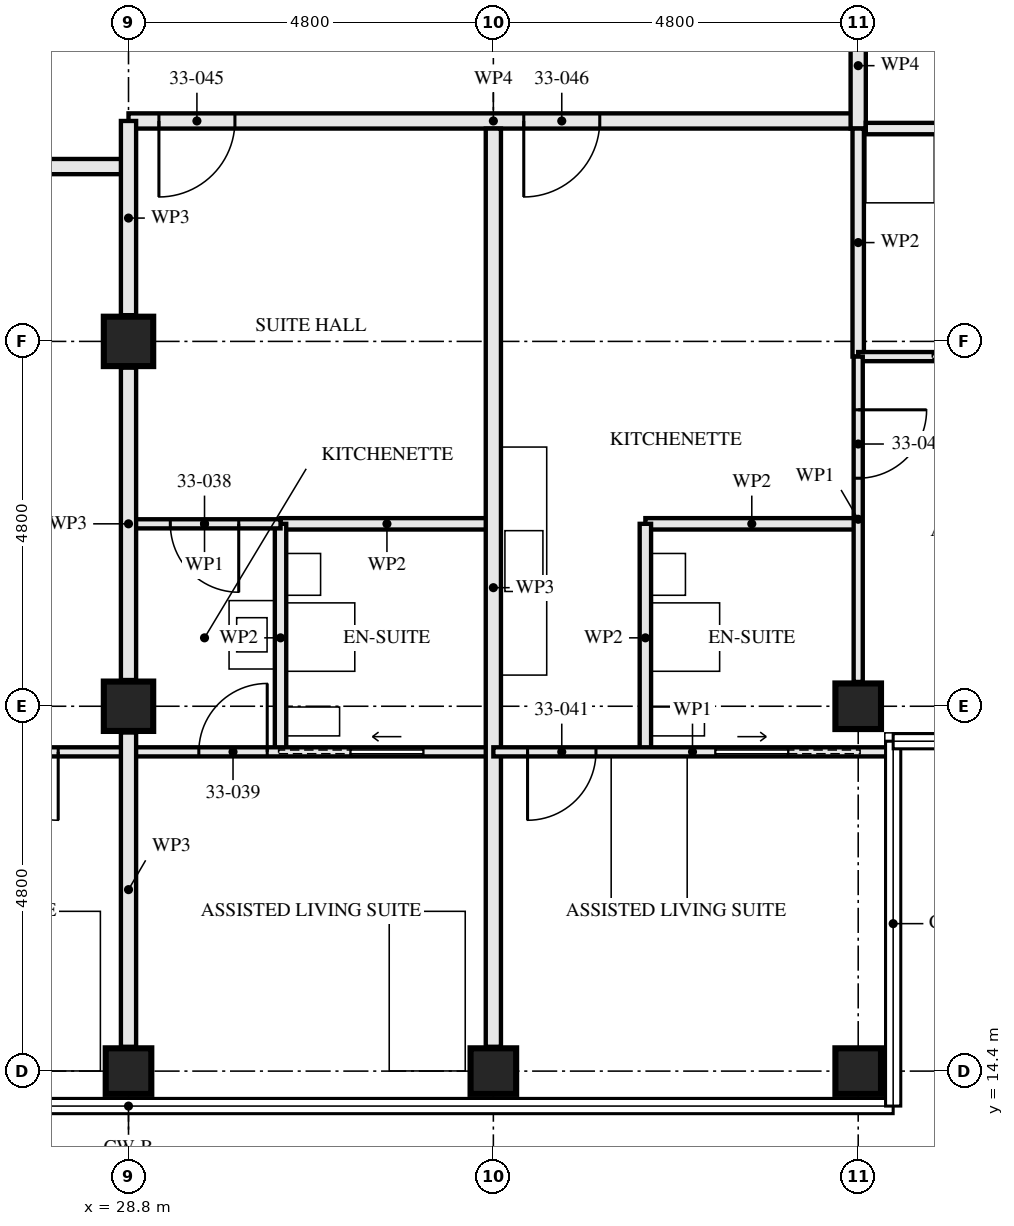
"""IFC4 building model, lengths in metres.
Left out: names, types, materials, properties, quantities, classifications, styles, units other than length and angle.
Written with IfcOpenShell. Run it as: python <this file> out.ifc"""

import sys

from ifc_helpers import new_model, si_unit, direction, frame, frame_2d, origin, origin_2d, place, context, subcontext, project, spatial, rectangle, hollow_rectangle, extrude, element, fill, save


model = new_model("IFC4")
c1 = context("Model", 3, precision=1e-05, world=origin(), true_north=direction((0.0, 1.0)))
c2 = subcontext(c1, "Body", "Model", "MODEL_VIEW")
j1 = project(units=[si_unit("LENGTHUNIT", "METRE"), si_unit("PLANEANGLEUNIT", "RADIAN")], contexts=[c1])
p1 = place(None, origin())
s1 = spatial("IfcSite", under=j1, at=p1, CompositionType="ELEMENT")
p2 = place(p1, origin())
s2 = spatial("IfcBuilding", under=s1, at=p2, CompositionType="ELEMENT")
p3 = place(p2, frame((0.0, 0.0, 122.5)))
s3 = spatial("IfcBuildingStorey", under=s2, at=p3, CompositionType="ELEMENT", Elevation=122.5)
p4 = place(p3, frame((28.8, 14.4, 0.0), z_axis=(0.0, 0.0, 1.0), x_axis=(0.0, 1.0, 0.0)))
e1 = element("IfcColumn", 1, at=p4, inside=s3, PredefinedType="COLUMN", context=c2, shape_type="SweptSolid", body=[
    extrude(hollow_rectangle(XDim=0.6, YDim=0.6, WallThickness=0.08, at=origin_2d()), origin(), (0.0, 0.0, 1.0), 3.5),
])
for number, where, z_axis, x_axis in (
    (2, (28.8, 19.2, 0.0), (0.0, 0.0, 1.0), (1.0, 0.0, 0.0)),
    (3, (28.8, 24.0, 0.0), (0.0, 0.0, 1.0), (1.0, 0.0, 0.0)),
):
    element("IfcColumn", number, at=place(p3, frame(where, z_axis=z_axis, x_axis=x_axis)), inside=s3, PredefinedType="COLUMN", context=c2, shape_type="SweptSolid", body=[
        extrude(hollow_rectangle(XDim=0.65, YDim=0.65, WallThickness=0.05, at=origin_2d()), origin(), (0.0, 0.0, 1.0), 3.5),
    ])
for number, where, z_axis, x_axis in (
    (4, (33.6, 14.4, 0.0), (0.0, 0.0, 1.0), (0.0, 1.0, 0.0)),
    (5, (38.4, 14.4, 0.0), (0.0, 0.0, 1.0), (0.0, 1.0, 0.0)),
    (6, (38.4, 19.2, 0.0), (0.0, 0.0, 1.0), (0.0, 1.0, 0.0)),
):
    element("IfcColumn", number, at=place(p3, frame(where, z_axis=z_axis, x_axis=x_axis)), inside=s3, PredefinedType="COLUMN", context=c2, shape_type="SweptSolid", body=[
        extrude(hollow_rectangle(XDim=0.6, YDim=0.6, WallThickness=0.08, at=origin_2d()), origin(), (0.0, 0.0, 1.0), 3.5),
    ])
p5 = place(p3, frame((24.0, 18.6, 0.0), z_axis=(0.0, 0.0, 1.0), x_axis=(1.0, 0.0, 0.0)))
e7 = element("IfcWall", 7, at=p5, inside=s3, PredefinedType="PARTITIONING", context=c2, shape_type="SweptSolid", body=[
    extrude(rectangle(XDim=4.8, YDim=0.12, at=frame_2d((2.4, 0.0))), origin(), (0.0, 0.0, 1.0), 3.33),
])
p6 = place(p5, frame((2.975, 0.0, 0.0)))
e8 = element("IfcOpeningElement", 8, at=p6, cuts=e7, PredefinedType="OPENING", context=c2, shape_type="SweptSolid", body=[
    extrude(rectangle(XDim=0.9, YDim=2.1, at=frame_2d((0.45, 1.05))), frame((0.0, 0.071, 0.0), z_axis=(0.0, -1.0, 0.0), x_axis=(1.0, 0.0, 0.0)), (0.0, 0.0, 1.0), 0.141),
])
p7 = place(p5, frame((0.925, 0.0, 0.0)))
e9 = element("IfcOpeningElement", 9, at=p7, cuts=e7, PredefinedType="OPENING", context=c2, shape_type="SweptSolid", body=[
    extrude(rectangle(XDim=0.95, YDim=2.1, at=frame_2d((0.475, 1.05))), frame((0.0, 0.071, 0.0), z_axis=(0.0, -1.0, 0.0), x_axis=(1.0, 0.0, 0.0)), (0.0, 0.0, 1.0), 0.141),
])
p8 = place(p3, frame((17.8, 26.3, 0.0), z_axis=(0.0, 0.0, 1.0), x_axis=(1.0, 0.0, 0.0)))
e10 = element("IfcWall", 10, at=p8, inside=s3, PredefinedType="PARTITIONING", context=c2, shape_type="SweptSolid", body=[
    extrude(rectangle(XDim=11.0, YDim=0.2, at=frame_2d((5.5, 0.0))), origin(), (0.0, 0.0, 1.0), 2.55),
])
p9 = place(p8, frame((0.25, 0.0, 0.0)))
e11 = element("IfcOpeningElement", 11, at=p9, cuts=e10, PredefinedType="OPENING", context=c2, shape_type="SweptSolid", body=[
    extrude(rectangle(XDim=0.9, YDim=2.1, at=frame_2d((0.45, 1.05))), frame((0.0, 0.111, 0.0), z_axis=(0.0, -1.0, 0.0), x_axis=(1.0, 0.0, 0.0)), (0.0, 0.0, 1.0), 0.221),
])
p10 = place(p8, frame((1.8, 0.0, 0.0)))
e12 = element("IfcOpeningElement", 12, at=p10, cuts=e10, PredefinedType="OPENING", context=c2, shape_type="SweptSolid", body=[
    extrude(rectangle(XDim=1.0, YDim=2.1, at=frame_2d((0.5, 1.05))), frame((0.0, 0.111, 0.0), z_axis=(0.0, -1.0, 0.0), x_axis=(1.0, 0.0, 0.0)), (0.0, 0.0, 1.0), 0.221),
])
p11 = place(p3, frame((30.8, 18.6, 0.0), z_axis=(0.0, 0.0, 1.0), x_axis=(0.0, 1.0, 0.0)))
e13 = element("IfcWall", 13, at=p11, inside=s3, PredefinedType="PARTITIONING", context=c2, shape_type="SweptSolid", body=[
    extrude(rectangle(XDim=3.0, YDim=0.15, at=frame_2d((1.5, 0.0))), origin(), (0.0, 0.0, 1.0), 2.55),
])
p12 = place(p3, frame((30.8, 21.6, 0.0), z_axis=(0.0, 0.0, 1.0), x_axis=(1.0, 0.0, 0.0)))
e14 = element("IfcWall", 14, at=p12, inside=s3, PredefinedType="PARTITIONING", context=c2, shape_type="SweptSolid", body=[
    extrude(rectangle(XDim=2.8, YDim=0.15, at=frame_2d((1.4, 0.0))), origin(), (0.0, 0.0, 1.0), 3.33),
])
p13 = place(p3, frame((28.8, 21.6, 0.0), z_axis=(0.0, 0.0, 1.0), x_axis=(1.0, 0.0, 0.0)))
e15 = element("IfcWall", 15, at=p13, inside=s3, PredefinedType="PARTITIONING", context=c2, shape_type="SweptSolid", body=[
    extrude(rectangle(XDim=2.0, YDim=0.12, at=frame_2d((1.0, 0.0))), origin(), (0.0, 0.0, 1.0), 3.33),
])
p14 = place(p13, frame((0.55, 0.0, 0.0)))
e16 = element("IfcOpeningElement", 16, at=p14, cuts=e15, PredefinedType="OPENING", context=c2, shape_type="SweptSolid", body=[
    extrude(rectangle(XDim=0.9, YDim=2.1, at=frame_2d((0.45, 1.05))), frame((0.0, 0.071, 0.0), z_axis=(0.0, -1.0, 0.0), x_axis=(1.0, 0.0, 0.0)), (0.0, 0.0, 1.0), 0.141),
])
p15 = place(p3, frame((28.8, 18.6, 0.0), z_axis=(0.0, 0.0, 1.0), x_axis=(1.0, 0.0, 0.0)))
e17 = element("IfcWall", 17, at=p15, inside=s3, PredefinedType="PARTITIONING", context=c2, shape_type="SweptSolid", body=[
    extrude(rectangle(XDim=4.8, YDim=0.12, at=frame_2d((2.4, 0.0))), origin(), (0.0, 0.0, 1.0), 3.33),
])
p16 = place(p15, frame((0.925, 0.0, 0.0)))
e18 = element("IfcOpeningElement", 18, at=p16, cuts=e17, PredefinedType="OPENING", context=c2, shape_type="SweptSolid", body=[
    extrude(rectangle(XDim=0.9, YDim=2.1, at=frame_2d((0.45, 1.05))), frame((0.0, 0.071, 0.0), z_axis=(0.0, -1.0, 0.0), x_axis=(1.0, 0.0, 0.0)), (0.0, 0.0, 1.0), 0.141),
])
p17 = place(p15, frame((2.925, 0.0, 0.0)))
e19 = element("IfcOpeningElement", 19, at=p17, cuts=e17, PredefinedType="OPENING", context=c2, shape_type="SweptSolid", body=[
    extrude(rectangle(XDim=0.95, YDim=2.1, at=frame_2d((0.475, 1.05))), frame((0.0, 0.071, 0.0), z_axis=(0.0, -1.0, 0.0), x_axis=(1.0, 0.0, 0.0)), (0.0, 0.0, 1.0), 0.141),
])
p18 = place(p3, frame((33.6, 14.72, 0.0), z_axis=(0.0, 0.0, 1.0), x_axis=(0.0, 1.0, 0.0)))
e20 = element("IfcWall", 20, at=p18, inside=s3, PredefinedType="PARTITIONING", context=c2, shape_type="SweptSolid", body=[
    extrude(rectangle(XDim=12.08, YDim=0.2, at=frame_2d((6.04, 0.0))), origin(), (0.0, 0.0, 1.0), 2.55),
])
p19 = place(p3, frame((35.6, 18.6, 0.0), z_axis=(0.0, 0.0, 1.0), x_axis=(0.0, 1.0, 0.0)))
e21 = element("IfcWall", 21, at=p19, inside=s3, PredefinedType="PARTITIONING", context=c2, shape_type="SweptSolid", body=[
    extrude(rectangle(XDim=3.0, YDim=0.15, at=frame_2d((1.5, 0.0))), origin(), (0.0, 0.0, 1.0), 2.55),
])
p20 = place(p3, frame((35.6, 21.6, 0.0), z_axis=(0.0, 0.0, 1.0), x_axis=(1.0, 0.0, 0.0)))
e22 = element("IfcWall", 22, at=p20, inside=s3, PredefinedType="PARTITIONING", context=c2, shape_type="SweptSolid", body=[
    extrude(rectangle(XDim=2.8, YDim=0.15, at=frame_2d((1.4, 0.0))), origin(), (0.0, 0.0, 1.0), 3.33),
])
p21 = place(p3, frame((38.4, 23.8, 0.0), z_axis=(0.0, 0.0, 1.0), x_axis=(0.0, 1.0, 0.0)))
e23 = element("IfcWall", 23, at=p21, inside=s3, PredefinedType="PARTITIONING", context=c2, shape_type="SweptSolid", body=[
    extrude(rectangle(XDim=3.0, YDim=0.15, at=frame_2d((1.5, 0.0))), origin(), (0.0, 0.0, 1.0), 2.55),
])
p22 = place(p3, frame((33.6, 18.6, 0.0), z_axis=(0.0, 0.0, 1.0), x_axis=(1.0, 0.0, 0.0)))
e24 = element("IfcWall", 24, at=p22, inside=s3, PredefinedType="PARTITIONING", context=c2, shape_type="SweptSolid", body=[
    extrude(rectangle(XDim=5.24, YDim=0.12, at=frame_2d((2.62, 0.0))), origin(), (0.0, 0.0, 1.0), 2.32),
])
p23 = place(p22, frame((0.45, 0.0, 0.0)))
e25 = element("IfcOpeningElement", 25, at=p23, cuts=e24, PredefinedType="OPENING", context=c2, shape_type="SweptSolid", body=[
    extrude(rectangle(XDim=0.9, YDim=2.1, at=frame_2d((0.45, 1.05))), frame((0.0, 0.071, 0.0), z_axis=(0.0, -1.0, 0.0), x_axis=(1.0, 0.0, 0.0)), (0.0, 0.0, 1.0), 0.141),
])
p24 = place(p22, frame((2.925, 0.0, 0.0)))
e26 = element("IfcOpeningElement", 26, at=p24, cuts=e24, PredefinedType="OPENING", context=c2, shape_type="SweptSolid", body=[
    extrude(rectangle(XDim=0.95, YDim=2.1, at=frame_2d((0.475, 1.05))), frame((0.0, 0.071, 0.0), z_axis=(0.0, -1.0, 0.0), x_axis=(1.0, 0.0, 0.0)), (0.0, 0.0, 1.0), 0.141),
])
p25 = place(p3, frame((38.4, 23.8, 0.0), z_axis=(0.0, 0.0, 1.0), x_axis=(1.0, 0.0, 0.0)))
e27 = element("IfcWall", 27, at=p25, inside=s3, PredefinedType="PARTITIONING", context=c2, shape_type="SweptSolid", body=[
    extrude(rectangle(XDim=4.48, YDim=0.12, at=frame_2d((2.24, 0.0))), origin(), (0.0, 0.0, 1.0), 3.33),
])
p26 = place(p25, frame((1.925, 0.0, 0.0)))
e28 = element("IfcOpeningElement", 28, at=p26, cuts=e27, PredefinedType="OPENING", context=c2, shape_type="SweptSolid", body=[
    extrude(rectangle(XDim=0.95, YDim=2.1, at=frame_2d((0.475, 1.05))), frame((0.0, 0.071, 0.0), z_axis=(0.0, -1.0, 0.0), x_axis=(1.0, 0.0, 0.0)), (0.0, 0.0, 1.0), 0.141),
])
p27 = place(p3, frame((38.4, 19.52, 0.0), z_axis=(0.0, 0.0, 1.0), x_axis=(0.0, 1.0, 0.0)))
e29 = element("IfcWall", 29, at=p27, inside=s3, PredefinedType="PARTITIONING", context=c2, shape_type="SweptSolid", body=[
    extrude(rectangle(XDim=4.28, YDim=0.12, at=frame_2d((2.14, 0.0))), origin(), (0.0, 0.0, 1.0), 3.33),
])
p28 = place(p27, frame((2.68, 0.0, 0.0)))
e30 = element("IfcOpeningElement", 30, at=p28, cuts=e29, PredefinedType="OPENING", context=c2, shape_type="SweptSolid", body=[
    extrude(rectangle(XDim=0.9, YDim=2.1, at=frame_2d((0.45, 1.05))), frame((0.0, 0.071, 0.0), z_axis=(0.0, -1.0, 0.0), x_axis=(1.0, 0.0, 0.0)), (0.0, 0.0, 1.0), 0.141),
])
p29 = place(p3, frame((28.8, 26.9, 0.0), z_axis=(0.0, 0.0, 1.0), x_axis=(1.0, 0.0, 0.0)))
e31 = element("IfcWall", 31, at=p29, inside=s3, PredefinedType="PARTITIONING", context=c2, shape_type="SweptSolid", body=[
    extrude(rectangle(XDim=9.6, YDim=0.2, at=frame_2d((4.8, 0.0))), origin(), (0.0, 0.0, 1.0), 3.33),
])
p30 = place(p29, frame((0.4, 0.0, 0.0)))
e32 = element("IfcOpeningElement", 32, at=p30, cuts=e31, PredefinedType="OPENING", context=c2, shape_type="SweptSolid", body=[
    extrude(rectangle(XDim=1.0, YDim=2.1, at=frame_2d((0.5, 1.05))), frame((0.0, 0.111, 0.0), z_axis=(0.0, -1.0, 0.0), x_axis=(1.0, 0.0, 0.0)), (0.0, 0.0, 1.0), 0.221),
])
p31 = place(p29, frame((5.2, 0.0, 0.0)))
e33 = element("IfcOpeningElement", 33, at=p31, cuts=e31, PredefinedType="OPENING", context=c2, shape_type="SweptSolid", body=[
    extrude(rectangle(XDim=1.0, YDim=2.1, at=frame_2d((0.5, 1.05))), frame((0.0, 0.111, 0.0), z_axis=(0.0, -1.0, 0.0), x_axis=(1.0, 0.0, 0.0)), (0.0, 0.0, 1.0), 0.221),
])
p32 = place(p3, frame((38.4, 26.8, 0.0), z_axis=(0.0, 0.0, 1.0), x_axis=(0.0, 1.0, 0.0)))
e34 = element("IfcWall", 34, at=p32, inside=s3, PredefinedType="PARTITIONING", context=c2, shape_type="SweptSolid", body=[
    extrude(rectangle(XDim=1.655, YDim=0.2, at=frame_2d((0.828, 0.0))), origin(), (0.0, 0.0, 1.0), 3.33),
])
p33 = place(p3, frame((28.8, 14.72, 0.0), z_axis=(0.0, 0.0, 1.0), x_axis=(0.0, 1.0, 0.0)))
e35 = element("IfcWall", 35, at=p33, inside=s3, PredefinedType="PARTITIONING", context=c2, shape_type="SweptSolid", body=[
    extrude(rectangle(XDim=4.135, YDim=0.2, at=frame_2d((2.067, 0.0))), origin(), (0.0, 0.0, 1.0), 2.32),
])
p34 = place(p3, frame((28.8, 19.545, 0.0), z_axis=(0.0, 0.0, 1.0), x_axis=(0.0, 1.0, 0.0)))
e36 = element("IfcWall", 36, at=p34, inside=s3, PredefinedType="PARTITIONING", context=c2, shape_type="SweptSolid", body=[
    extrude(rectangle(XDim=4.11, YDim=0.2, at=frame_2d((2.055, 0.0))), origin(), (0.0, 0.0, 1.0), 2.32),
])
p35 = place(p3, frame((28.8, 24.345, 0.0), z_axis=(0.0, 0.0, 1.0), x_axis=(0.0, 1.0, 0.0)))
e37 = element("IfcWall", 37, at=p35, inside=s3, PredefinedType="PARTITIONING", context=c2, shape_type="SweptSolid", body=[
    extrude(rectangle(XDim=2.555, YDim=0.2, at=frame_2d((1.277, 0.0))), origin(), (0.0, 0.0, 1.0), 2.32),
])
p36 = place(p3, frame((38.5, 26.8, 0.0), z_axis=(0.0, 0.0, 1.0), x_axis=(1.0, 0.0, 0.0)))
e38 = element("IfcWall", 38, at=p36, inside=s3, PredefinedType="PARTITIONING", context=c2, shape_type="SweptSolid", body=[
    extrude(rectangle(XDim=5.14, YDim=0.15, at=frame_2d((2.57, 0.0))), origin(), (0.0, 0.0, 1.0), 2.32),
])
p37 = place(p6, frame((0.9, 0.0, 0.0), z_axis=(0.0, 0.0, 1.0), x_axis=(-1.0, 0.0, 0.0)))
e39 = element("IfcDoor", 39, at=p37, inside=s3, OperationType="SINGLE_SWING_RIGHT", PredefinedType="DOOR", context=c2, shape_type="SweptSolid", body=[
    extrude(rectangle(XDim=0.9, YDim=2.1, at=frame_2d((0.45, 1.05))), frame((0.0, 0.022, 0.0), z_axis=(0.0, -1.0, 0.0), x_axis=(1.0, 0.0, 0.0)), (0.0, 0.0, 1.0), 0.044),
])
fill(e8, e39)
p38 = place(p14, frame((0.9, 0.0, 0.0), z_axis=(0.0, 0.0, 1.0), x_axis=(-1.0, 0.0, 0.0)))
e40 = element("IfcDoor", 40, at=p38, inside=s3, OperationType="SINGLE_SWING_RIGHT", PredefinedType="DOOR", context=c2, shape_type="SweptSolid", body=[
    extrude(rectangle(XDim=0.9, YDim=2.1, at=frame_2d((0.45, 1.05))), frame((0.0, 0.022, 0.0), z_axis=(0.0, -1.0, 0.0), x_axis=(1.0, 0.0, 0.0)), (0.0, 0.0, 1.0), 0.044),
])
fill(e16, e40)
p39 = place(p16, origin())
e41 = element("IfcDoor", 41, at=p39, inside=s3, OperationType="SINGLE_SWING_LEFT", PredefinedType="DOOR", context=c2, shape_type="SweptSolid", body=[
    extrude(rectangle(XDim=0.9, YDim=2.1, at=frame_2d((0.45, 1.05))), frame((0.0, 0.022, 0.0), z_axis=(0.0, -1.0, 0.0), x_axis=(1.0, 0.0, 0.0)), (0.0, 0.0, 1.0), 0.044),
])
fill(e18, e41)
p40 = place(p17, origin())
e42 = element("IfcDoor", 42, at=p40, inside=s3, OperationType="SLIDING_TO_RIGHT", PredefinedType="DOOR", context=c2, shape_type="SweptSolid", body=[
    extrude(rectangle(XDim=0.95, YDim=2.1, at=frame_2d((0.475, 1.05))), frame((0.0, 0.022, 0.0), z_axis=(0.0, -1.0, 0.0), x_axis=(1.0, 0.0, 0.0)), (0.0, 0.0, 1.0), 0.044),
])
fill(e19, e42)
p41 = place(p23, frame((0.9, 0.0, 0.0), z_axis=(0.0, 0.0, 1.0), x_axis=(-1.0, 0.0, 0.0)))
e43 = element("IfcDoor", 43, at=p41, inside=s3, OperationType="SINGLE_SWING_LEFT", PredefinedType="DOOR", context=c2, shape_type="SweptSolid", body=[
    extrude(rectangle(XDim=0.9, YDim=2.1, at=frame_2d((0.45, 1.05))), frame((0.0, 0.022, 0.0), z_axis=(0.0, -1.0, 0.0), x_axis=(1.0, 0.0, 0.0)), (0.0, 0.0, 1.0), 0.044),
])
fill(e25, e43)
p42 = place(p24, origin())
e44 = element("IfcDoor", 44, at=p42, inside=s3, OperationType="SLIDING_TO_LEFT", PredefinedType="DOOR", context=c2, shape_type="SweptSolid", body=[
    extrude(rectangle(XDim=0.95, YDim=2.1, at=frame_2d((0.475, 1.05))), frame((0.0, 0.022, 0.0), z_axis=(0.0, -1.0, 0.0), x_axis=(1.0, 0.0, 0.0)), (0.0, 0.0, 1.0), 0.044),
])
fill(e26, e44)
p43 = place(p28, frame((0.9, 0.0, 0.0), z_axis=(0.0, 0.0, 1.0), x_axis=(-1.0, 0.0, 0.0)))
e45 = element("IfcDoor", 45, at=p43, inside=s3, OperationType="SINGLE_SWING_RIGHT", PredefinedType="DOOR", context=c2, shape_type="SweptSolid", body=[
    extrude(rectangle(XDim=0.9, YDim=2.1, at=frame_2d((0.45, 1.05))), frame((0.0, 0.022, 0.0), z_axis=(0.0, -1.0, 0.0), x_axis=(1.0, 0.0, 0.0)), (0.0, 0.0, 1.0), 0.044),
])
fill(e30, e45)
p44 = place(p30, frame((1.0, 0.0, 0.0), z_axis=(0.0, 0.0, 1.0), x_axis=(-1.0, 0.0, 0.0)))
e46 = element("IfcDoor", 46, at=p44, inside=s3, OperationType="SINGLE_SWING_LEFT", PredefinedType="DOOR", context=c2, shape_type="SweptSolid", body=[
    extrude(rectangle(XDim=1.0, YDim=2.1, at=frame_2d((0.5, 1.05))), frame((0.0, 0.027, 0.0), z_axis=(0.0, -1.0, 0.0), x_axis=(1.0, 0.0, 0.0)), (0.0, 0.0, 1.0), 0.054),
])
fill(e32, e46)
p45 = place(p31, frame((1.0, 0.0, 0.0), z_axis=(0.0, 0.0, 1.0), x_axis=(-1.0, 0.0, 0.0)))
e47 = element("IfcDoor", 47, at=p45, inside=s3, OperationType="SINGLE_SWING_LEFT", PredefinedType="DOOR", context=c2, shape_type="SweptSolid", body=[
    extrude(rectangle(XDim=1.0, YDim=2.1, at=frame_2d((0.5, 1.05))), frame((0.0, 0.027, 0.0), z_axis=(0.0, -1.0, 0.0), x_axis=(1.0, 0.0, 0.0)), (0.0, 0.0, 1.0), 0.054),
])
fill(e33, e47)
save(model, sys.argv[1])
